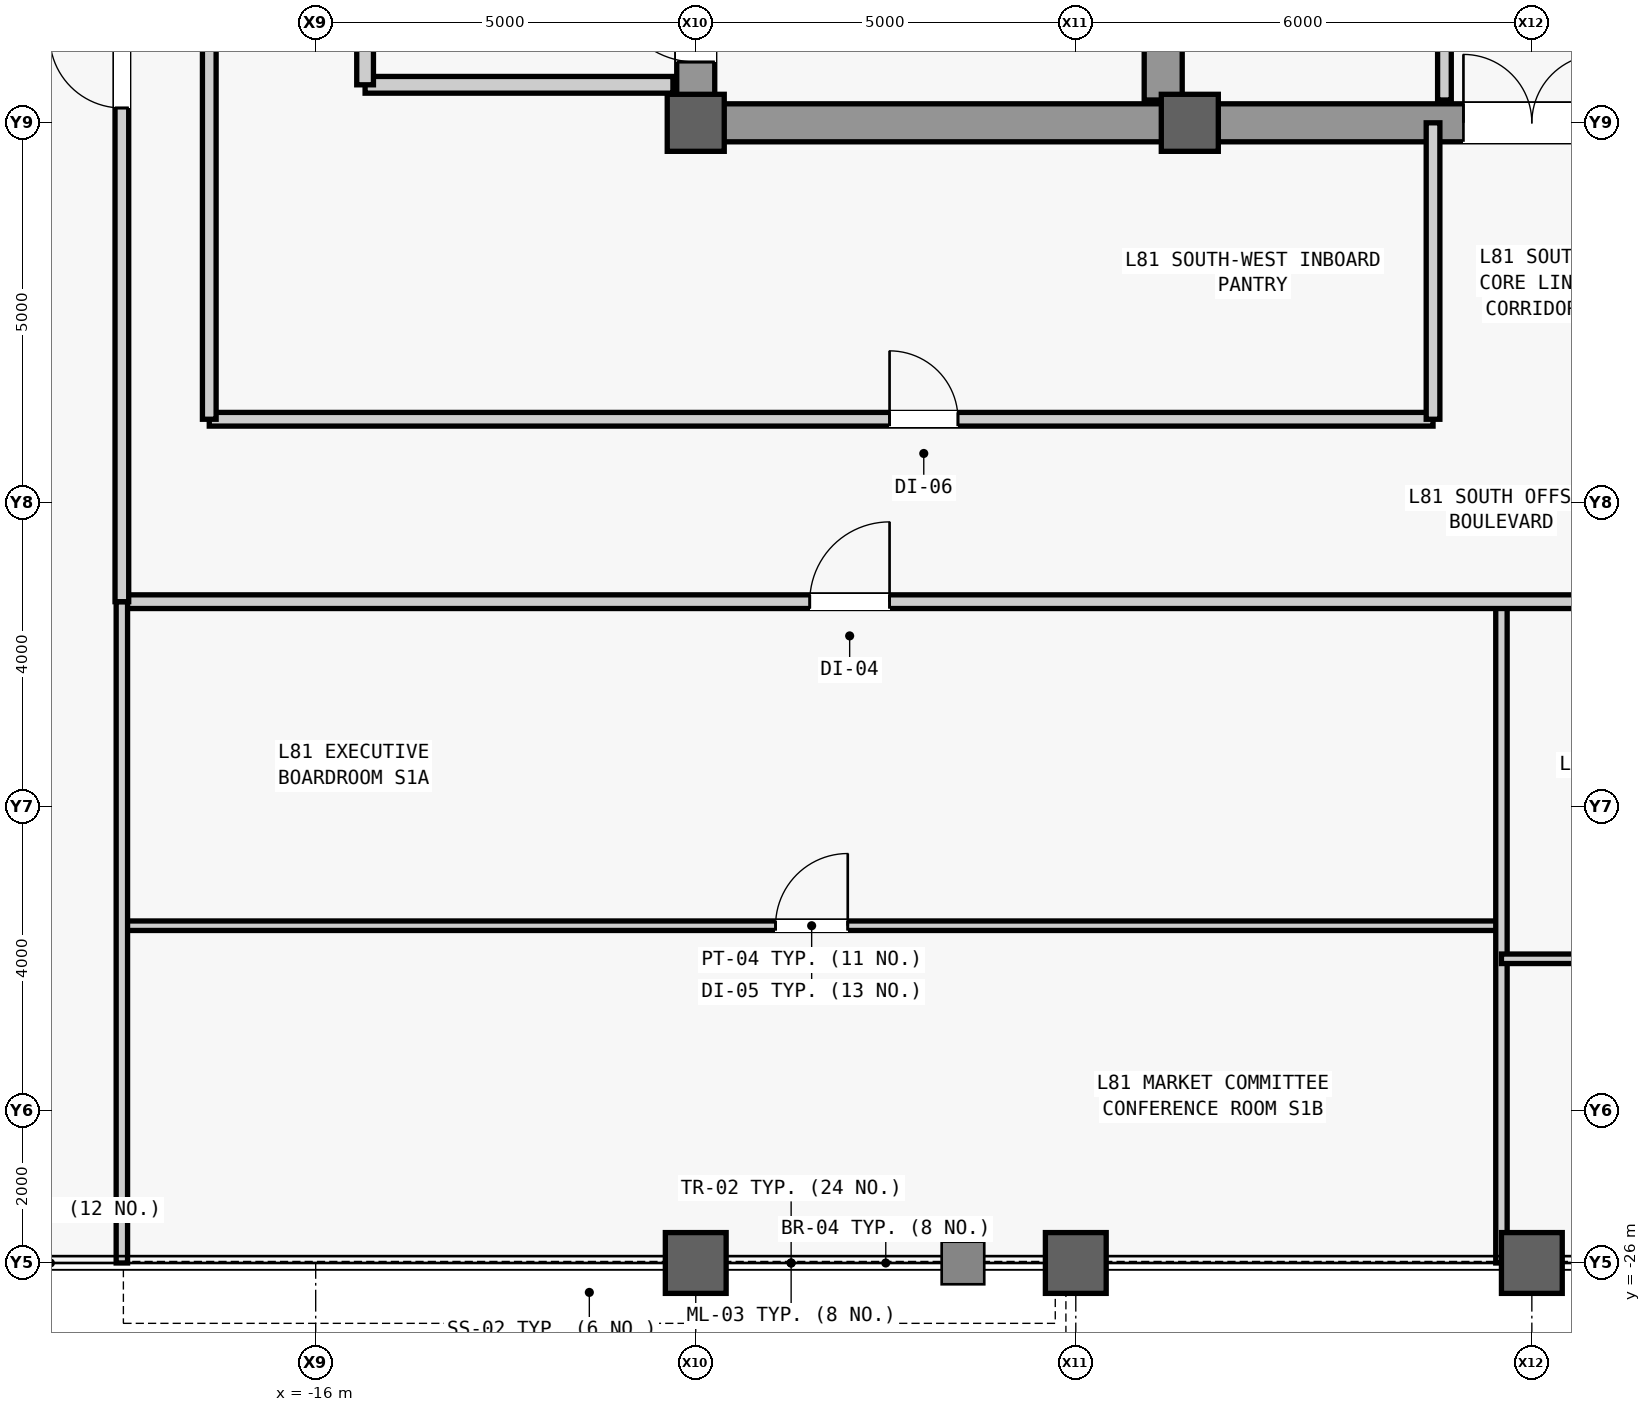
"""IFC4 building model, lengths in metres.
Left out: names, types, materials, properties, quantities, classifications, styles, units other than length and angle.
Written with IfcOpenShell. Run it as: python <this file> out.ifc"""

import sys

from ifc_helpers import new_model, si_unit, direction, frame, frame_2d, origin, origin_2d, place, context, subcontext, project, spatial, rectangle, hollow_rectangle, extrude, source, transform, mapped, element, fill, save


model = new_model("IFC4")
c1 = context("Model", 3, precision=1e-05, world=origin(), true_north=direction((0.0, 1.0)))
c2 = subcontext(c1, "Body", "Model", "MODEL_VIEW")
j1 = project(units=[si_unit("LENGTHUNIT", "METRE"), si_unit("PLANEANGLEUNIT", "RADIAN")], contexts=[c1])
p1 = place(None, origin())
s1 = spatial("IfcSite", under=j1, at=p1, CompositionType="ELEMENT")
p2 = place(p1, origin())
s2 = spatial("IfcBuilding", under=s1, at=p2, CompositionType="ELEMENT")
p3 = place(p2, frame((0.0, 0.0, 342.3)))
s3 = spatial("IfcBuildingStorey", under=s2, at=p3, CompositionType="ELEMENT", Elevation=342.3)
m1 = source(origin(), c2, "Body", "SweptSolid", [
    extrude(rectangle(XDim=22.0, YDim=0.5, at=frame_2d((11.0, 0.0))), origin(), (0.0, 0.0, 1.0), 3.7),
])
p4 = place(p3, frame((-11.0, -11.0, 0.0), z_axis=(0.0, 0.0, 1.0), x_axis=(0.0, 1.0, 0.0)))
e1 = element("IfcWall", 1, at=p4, inside=s3, PredefinedType="SHEAR", context=c2, shape_type="MappedRepresentation", body=[
    mapped(m1, transform((0.0, 0.0, 0.0), scale=1.0)),
])
m2 = source(origin(), c2, "Body", "SweptSolid", [
    extrude(rectangle(XDim=1.1, YDim=2.2, at=frame_2d((0.55, 1.1))), frame((0.0, 0.26, 0.0), z_axis=(0.0, -1.0, 0.0), x_axis=(1.0, 0.0, 0.0)), (0.0, 0.0, 1.0), 0.52),
])
p5 = place(p4, frame((0.8, 0.0, 0.0)))
e2 = element("IfcOpeningElement", 2, at=p5, cuts=e1, PredefinedType="OPENING", context=c2, shape_type="MappedRepresentation", body=[
    mapped(m2, transform((0.0, 0.0, 0.0), scale=1.0)),
])
p6 = place(p4, frame((12.5, 0.0, 0.0)))
e3 = element("IfcOpeningElement", 3, at=p6, cuts=e1, PredefinedType="OPENING", context=c2, shape_type="MappedRepresentation", body=[
    mapped(m2, transform((0.0, 0.0, 0.0), scale=1.0)),
])
m3 = source(origin(), c2, "Body", "SweptSolid", [
    extrude(rectangle(XDim=0.9, YDim=2.15, at=frame_2d((0.45, 1.075))), frame((0.0, 0.26, 0.0), z_axis=(0.0, -1.0, 0.0), x_axis=(1.0, 0.0, 0.0)), (0.0, 0.0, 1.0), 0.52),
])
p7 = place(p4, frame((6.2, 0.0, 0.0)))
e4 = element("IfcOpeningElement", 4, at=p7, cuts=e1, PredefinedType="OPENING", context=c2, shape_type="MappedRepresentation", body=[
    mapped(m3, transform((0.0, 0.0, 0.0), scale=1.0)),
])
p8 = place(p4, frame((8.05, 0.0, 0.0)))
e5 = element("IfcOpeningElement", 5, at=p8, cuts=e1, PredefinedType="OPENING", context=c2, shape_type="MappedRepresentation", body=[
    mapped(m3, transform((0.0, 0.0, 0.0), scale=1.0)),
])
m4 = source(origin(), c2, "Body", "SweptSolid", [
    extrude(rectangle(XDim=1.2, YDim=2.3, at=frame_2d((0.6, 1.15))), frame((0.0, 0.26, 0.0), z_axis=(0.0, -1.0, 0.0), x_axis=(1.0, 0.0, 0.0)), (0.0, 0.0, 1.0), 0.52),
])
p9 = place(p4, frame((14.6, 0.0, 0.0)))
e6 = element("IfcOpeningElement", 6, at=p9, cuts=e1, PredefinedType="OPENING", context=c2, shape_type="MappedRepresentation", body=[
    mapped(m4, transform((0.0, 0.0, 0.0), scale=1.0)),
])
p10 = place(p4, frame((18.2, 0.0, 0.0)))
e7 = element("IfcOpeningElement", 7, at=p10, cuts=e1, PredefinedType="OPENING", context=c2, shape_type="MappedRepresentation", body=[
    mapped(m4, transform((0.0, 0.0, 0.0), scale=1.0)),
])
m5 = source(origin(), c2, "Body", "SweptSolid", [
    extrude(rectangle(XDim=1.3, YDim=2.3, at=frame_2d((0.65, 1.15))), frame((0.0, 0.26, 0.0), z_axis=(0.0, -1.0, 0.0), x_axis=(1.0, 0.0, 0.0)), (0.0, 0.0, 1.0), 0.52),
])
p11 = place(p4, frame((2.7, 0.0, 0.0)))
e8 = element("IfcOpeningElement", 8, at=p11, cuts=e1, PredefinedType="OPENING", context=c2, shape_type="MappedRepresentation", body=[
    mapped(m5, transform((0.0, 0.0, 0.0), scale=1.0)),
])
m6 = source(origin(), c2, "Body", "SweptSolid", [
    extrude(rectangle(XDim=21.4, YDim=0.5, at=frame_2d((10.7, 0.0))), origin(), (0.0, 0.0, 1.0), 3.7),
])
p12 = place(p3, frame((-4.85, -10.7, 0.0), z_axis=(0.0, 0.0, 1.0), x_axis=(0.0, 1.0, 0.0)))
e9 = element("IfcWall", 9, at=p12, inside=s3, PredefinedType="SHEAR", context=c2, shape_type="MappedRepresentation", body=[
    mapped(m6, transform((0.0, 0.0, 0.0), scale=1.0)),
])
m7 = source(origin(), c2, "Body", "SweptSolid", [
    extrude(rectangle(XDim=5.9, YDim=0.5, at=frame_2d((2.95, 0.0))), origin(), (0.0, 0.0, 1.0), 3.7),
])
p13 = place(p3, frame((-10.75, -11.0, 0.0), z_axis=(0.0, 0.0, 1.0), x_axis=(1.0, 0.0, 0.0)))
e10 = element("IfcWall", 10, at=p13, inside=s3, PredefinedType="SHEAR", context=c2, shape_type="MappedRepresentation", body=[
    mapped(m7, transform((0.0, 0.0, 0.0), scale=1.0)),
])
m8 = source(origin(), c2, "Body", "SweptSolid", [
    extrude(rectangle(XDim=9.2, YDim=0.5, at=frame_2d((4.6, 0.0))), origin(), (0.0, 0.0, 1.0), 3.7),
])
p14 = place(p3, frame((-4.6, -11.0, 0.0), z_axis=(0.0, 0.0, 1.0), x_axis=(1.0, 0.0, 0.0)))
e11 = element("IfcWall", 11, at=p14, inside=s3, PredefinedType="SHEAR", context=c2, shape_type="MappedRepresentation", body=[
    mapped(m8, transform((0.0, 0.0, 0.0), scale=1.0)),
])
m9 = source(origin(), c2, "Body", "SweptSolid", [
    extrude(rectangle(XDim=1.8, YDim=2.25, at=frame_2d((0.9, 1.125))), frame((0.0, 0.26, 0.0), z_axis=(0.0, -1.0, 0.0), x_axis=(1.0, 0.0, 0.0)), (0.0, 0.0, 1.0), 0.52),
])
p15 = place(p14, frame((3.7, 0.0, 0.0)))
e12 = element("IfcOpeningElement", 12, at=p15, cuts=e11, PredefinedType="OPENING", context=c2, shape_type="MappedRepresentation", body=[
    mapped(m9, transform((0.0, 0.0, 0.0), scale=1.0)),
])
m10 = source(origin(), c2, "Body", "SweptSolid", [
    extrude(hollow_rectangle(XDim=0.8, YDim=0.8, WallThickness=0.045, at=origin_2d()), origin(), (0.0, 0.0, 1.0), 4.0),
])
p16 = place(p3, frame((-11.0, -26.0, 0.0), z_axis=(0.0, 0.0, 1.0), x_axis=(1.0, 0.0, 0.0)))
e13 = element("IfcColumn", 13, at=p16, inside=s3, PredefinedType="COLUMN", context=c2, shape_type="MappedRepresentation", body=[
    mapped(m10, transform((0.0, 0.0, 0.0), scale=1.0)),
])
m11 = source(origin(), c2, "Body", "SweptSolid", [
    extrude(rectangle(XDim=0.75, YDim=0.75, at=origin_2d()), origin(), (0.0, 0.0, 1.0), 4.0),
])
p17 = place(p3, frame((-11.0, -11.0, 0.0), z_axis=(0.0, 0.0, 1.0), x_axis=(1.0, 0.0, 0.0)))
e14 = element("IfcColumn", 14, at=p17, inside=s3, PredefinedType="COLUMN", context=c2, shape_type="MappedRepresentation", body=[
    mapped(m11, transform((0.0, 0.0, 0.0), scale=1.0)),
])
p18 = place(p3, frame((-6.0, -26.0, 0.0), z_axis=(0.0, 0.0, 1.0), x_axis=(1.0, 0.0, 0.0)))
e15 = element("IfcColumn", 15, at=p18, inside=s3, PredefinedType="COLUMN", context=c2, shape_type="MappedRepresentation", body=[
    mapped(m10, transform((0.0, 0.0, 0.0), scale=1.0)),
])
p19 = place(p3, frame((-4.5, -11.0, 0.0), z_axis=(0.0, 0.0, 1.0), x_axis=(1.0, 0.0, 0.0)))
e16 = element("IfcColumn", 16, at=p19, inside=s3, PredefinedType="COLUMN", context=c2, shape_type="MappedRepresentation", body=[
    mapped(m11, transform((0.0, 0.0, 0.0), scale=1.0)),
])
p20 = place(p3, frame((0.0, -26.0, 0.0), z_axis=(0.0, 0.0, 1.0), x_axis=(1.0, 0.0, 0.0)))
e17 = element("IfcColumn", 17, at=p20, inside=s3, PredefinedType="COLUMN", context=c2, shape_type="MappedRepresentation", body=[
    mapped(m10, transform((0.0, 0.0, 0.0), scale=1.0)),
])
m12 = source(origin(), c2, "Body", "SweptSolid", [
    extrude(rectangle(XDim=4.05, YDim=0.22, at=frame_2d((2.025, 0.0))), origin(), (0.0, 0.0, 1.0), 3.7),
])
p21 = place(p3, frame((-15.35, -10.5, 0.0), z_axis=(0.0, 0.0, 1.0), x_axis=(1.0, 0.0, 0.0)))
e18 = element("IfcWall", 18, at=p21, inside=s3, PredefinedType="PARTITIONING", context=c2, shape_type="MappedRepresentation", body=[
    mapped(m12, transform((0.0, 0.0, 0.0), scale=1.0)),
])
m13 = source(origin(), c2, "Body", "SweptSolid", [
    extrude(rectangle(XDim=4.4, YDim=0.22, at=frame_2d((2.2, 0.0))), origin(), (0.0, 0.0, 1.0), 3.7),
])
p22 = place(p3, frame((-15.35, -10.5, 0.0), z_axis=(0.0, 0.0, 1.0), x_axis=(0.0, 1.0, 0.0)))
e19 = element("IfcWall", 19, at=p22, inside=s3, PredefinedType="PARTITIONING", context=c2, shape_type="MappedRepresentation", body=[
    mapped(m13, transform((0.0, 0.0, 0.0), scale=1.0)),
])
m14 = source(origin(), c2, "Body", "SweptSolid", [
    extrude(rectangle(XDim=1.2, YDim=2.2, at=frame_2d((0.6, 1.1))), frame((0.0, 0.12, 0.0), z_axis=(0.0, -1.0, 0.0), x_axis=(1.0, 0.0, 0.0)), (0.0, 0.0, 1.0), 0.24),
])
p23 = place(p22, frame((1.6, 0.0, 0.0)))
e20 = element("IfcOpeningElement", 20, at=p23, cuts=e19, PredefinedType="OPENING", context=c2, shape_type="MappedRepresentation", body=[
    mapped(m14, transform((0.0, 0.0, 0.0), scale=1.0)),
])
m15 = source(origin(), c2, "Body", "SweptSolid", [
    extrude(rectangle(XDim=5.4, YDim=0.18, at=frame_2d((2.7, 0.0))), origin(), (0.0, 0.0, 1.0), 3.7),
])
p24 = place(p3, frame((-1.15, -10.7, 0.0), z_axis=(0.0, 0.0, 1.0), x_axis=(0.0, 1.0, 0.0)))
e21 = element("IfcWall", 21, at=p24, inside=s3, PredefinedType="PARTITIONING", context=c2, shape_type="MappedRepresentation", body=[
    mapped(m15, transform((0.0, 0.0, 0.0), scale=1.0)),
])
m16 = source(origin(), c2, "Body", "SweptSolid", [
    extrude(rectangle(XDim=0.9, YDim=2.15, at=frame_2d((0.45, 1.075))), frame((0.0, 0.1, 0.0), z_axis=(0.0, -1.0, 0.0), x_axis=(1.0, 0.0, 0.0)), (0.0, 0.0, 1.0), 0.2),
])
p25 = place(p24, frame((2.25, 0.0, 0.0)))
e22 = element("IfcOpeningElement", 22, at=p25, cuts=e21, PredefinedType="OPENING", context=c2, shape_type="MappedRepresentation", body=[
    mapped(m16, transform((0.0, 0.0, 0.0), scale=1.0)),
])
m17 = source(origin(), c2, "Body", "SweptSolid", [
    extrude(rectangle(XDim=16.1, YDim=0.18, at=frame_2d((8.05, 0.0))), origin(), (0.0, 0.0, 1.0), 3.7),
])
p26 = place(p3, frame((-17.4, -14.9, 0.0), z_axis=(0.0, 0.0, 1.0), x_axis=(1.0, 0.0, 0.0)))
e23 = element("IfcWall", 23, at=p26, inside=s3, PredefinedType="PARTITIONING", context=c2, shape_type="MappedRepresentation", body=[
    mapped(m17, transform((0.0, 0.0, 0.0), scale=1.0)),
])
p27 = place(p26, frame((8.95, 0.0, 0.0)))
e24 = element("IfcOpeningElement", 24, at=p27, cuts=e23, PredefinedType="OPENING", context=c2, shape_type="MappedRepresentation", body=[
    mapped(m16, transform((0.0, 0.0, 0.0), scale=1.0)),
])
m18 = source(origin(), c2, "Body", "SweptSolid", [
    extrude(rectangle(XDim=5.1, YDim=0.18, at=frame_2d((2.55, 0.0))), origin(), (0.0, 0.0, 1.0), 3.7),
])
p28 = place(p3, frame((-17.4, -14.9, 0.0), z_axis=(0.0, 0.0, 1.0), x_axis=(0.0, 1.0, 0.0)))
e25 = element("IfcWall", 25, at=p28, inside=s3, PredefinedType="PARTITIONING", context=c2, shape_type="MappedRepresentation", body=[
    mapped(m18, transform((0.0, 0.0, 0.0), scale=1.0)),
])
m19 = source(origin(), c2, "Body", "SweptSolid", [
    extrude(rectangle(XDim=3.9, YDim=0.18, at=frame_2d((1.95, 0.0))), origin(), (0.0, 0.0, 1.0), 3.7),
])
p29 = place(p3, frame((-1.3, -14.9, 0.0), z_axis=(0.0, 0.0, 1.0), x_axis=(0.0, 1.0, 0.0)))
e26 = element("IfcWall", 26, at=p29, inside=s3, PredefinedType="PARTITIONING", context=c2, shape_type="MappedRepresentation", body=[
    mapped(m19, transform((0.0, 0.0, 0.0), scale=1.0)),
])
m20 = source(origin(), c2, "Body", "SweptSolid", [
    extrude(rectangle(XDim=18.15, YDim=0.125, at=frame_2d((9.075, 0.0))), origin(), (0.0, 0.0, 1.0), 3.7),
])
p30 = place(p3, frame((-18.55, -21.563, 0.0), z_axis=(0.0, 0.0, 1.0), x_axis=(1.0, 0.0, 0.0)))
e27 = element("IfcWall", 27, at=p30, inside=s3, PredefinedType="PARTITIONING", context=c2, shape_type="MappedRepresentation", body=[
    mapped(m20, transform((0.0, 0.0, 0.0), scale=1.0)),
])
m21 = source(origin(), c2, "Body", "SweptSolid", [
    extrude(rectangle(XDim=0.95, YDim=2.15, at=frame_2d((0.475, 1.075))), frame((0.0, 0.073, 0.0), z_axis=(0.0, -1.0, 0.0), x_axis=(1.0, 0.0, 0.0)), (0.0, 0.0, 1.0), 0.145),
])
p31 = place(p30, frame((8.6, 0.0, 0.0)))
e28 = element("IfcOpeningElement", 28, at=p31, cuts=e27, PredefinedType="OPENING", context=c2, shape_type="MappedRepresentation", body=[
    mapped(m21, transform((0.0, 0.0, 0.0), scale=1.0)),
])
m22 = source(origin(), c2, "Body", "SweptSolid", [
    extrude(rectangle(XDim=8.7, YDim=0.15, at=frame_2d((4.35, 0.0))), origin(), (0.0, 0.0, 1.0), 3.7),
])
p32 = place(p3, frame((-0.4, -26.0, 0.0), z_axis=(0.0, 0.0, 1.0), x_axis=(0.0, 1.0, 0.0)))
e29 = element("IfcWall", 29, at=p32, inside=s3, PredefinedType="PARTITIONING", context=c2, shape_type="MappedRepresentation", body=[
    mapped(m22, transform((0.0, 0.0, 0.0), scale=1.0)),
])
m23 = source(origin(), c2, "Body", "SweptSolid", [
    extrude(rectangle(XDim=18.15, YDim=0.125, at=frame_2d((9.075, 0.0))), origin(), (0.0, 0.0, 1.0), 3.7),
])
p33 = place(p3, frame((-0.4, -21.998, 0.0), z_axis=(0.0, 0.0, 1.0), x_axis=(1.0, 0.0, 0.0)))
e30 = element("IfcWall", 30, at=p33, inside=s3, PredefinedType="PARTITIONING", context=c2, shape_type="MappedRepresentation", body=[
    mapped(m23, transform((0.0, 0.0, 0.0), scale=1.0)),
])
p34 = place(p33, frame((8.6, 0.0, 0.0)))
e31 = element("IfcOpeningElement", 31, at=p34, cuts=e30, PredefinedType="OPENING", context=c2, shape_type="MappedRepresentation", body=[
    mapped(m21, transform((0.0, 0.0, 0.0), scale=1.0)),
])
m24 = source(origin(), c2, "Body", "SweptSolid", [
    extrude(rectangle(XDim=36.3, YDim=0.18, at=frame_2d((18.15, 0.0))), origin(), (0.0, 0.0, 1.0), 3.7),
])
p35 = place(p3, frame((-18.55, -17.3, 0.0), z_axis=(0.0, 0.0, 1.0), x_axis=(1.0, 0.0, 0.0)))
e32 = element("IfcWall", 32, at=p35, inside=s3, PredefinedType="PARTITIONING", context=c2, shape_type="MappedRepresentation", body=[
    mapped(m24, transform((0.0, 0.0, 0.0), scale=1.0)),
])
m25 = source(origin(), c2, "Body", "SweptSolid", [
    extrude(rectangle(XDim=1.05, YDim=2.2, at=frame_2d((0.525, 1.1))), frame((0.0, 0.1, 0.0), z_axis=(0.0, -1.0, 0.0), x_axis=(1.0, 0.0, 0.0)), (0.0, 0.0, 1.0), 0.2),
])
p36 = place(p35, frame((9.05, 0.0, 0.0)))
e33 = element("IfcOpeningElement", 33, at=p36, cuts=e32, PredefinedType="OPENING", context=c2, shape_type="MappedRepresentation", body=[
    mapped(m25, transform((0.0, 0.0, 0.0), scale=1.0)),
])
p37 = place(p35, frame((26.175, 0.0, 0.0)))
e34 = element("IfcOpeningElement", 34, at=p37, cuts=e32, PredefinedType="OPENING", context=c2, shape_type="MappedRepresentation", body=[
    mapped(m25, transform((0.0, 0.0, 0.0), scale=1.0)),
])
p38 = place(p3, frame((-18.55, -26.0, 0.0), z_axis=(0.0, 0.0, 1.0), x_axis=(0.0, 1.0, 0.0)))
e35 = element("IfcWall", 35, at=p38, inside=s3, PredefinedType="PARTITIONING", context=c2, shape_type="MappedRepresentation", body=[
    mapped(m22, transform((0.0, 0.0, 0.0), scale=1.0)),
])
m26 = source(origin(), c2, "Body", "SweptSolid", [
    extrude(rectangle(XDim=37.3, YDim=0.18, at=frame_2d((18.65, 0.0))), origin(), (0.0, 0.0, 1.0), 3.7),
])
p39 = place(p3, frame((-18.55, -17.3, 0.0), z_axis=(0.0, 0.0, 1.0), x_axis=(0.0, 1.0, 0.0)))
e36 = element("IfcWall", 36, at=p39, inside=s3, PredefinedType="PARTITIONING", context=c2, shape_type="MappedRepresentation", body=[
    mapped(m26, transform((0.0, 0.0, 0.0), scale=1.0)),
])
m27 = source(origin(), c2, "Body", "SweptSolid", [
    extrude(rectangle(XDim=0.95, YDim=2.15, at=frame_2d((0.475, 1.075))), frame((0.0, 0.1, 0.0), z_axis=(0.0, -1.0, 0.0), x_axis=(1.0, 0.0, 0.0)), (0.0, 0.0, 1.0), 0.2),
])
p40 = place(p39, frame((6.495, 0.0, 0.0)))
e37 = element("IfcOpeningElement", 37, at=p40, cuts=e36, PredefinedType="OPENING", context=c2, shape_type="MappedRepresentation", body=[
    mapped(m27, transform((0.0, 0.0, 0.0), scale=1.0)),
])
p41 = place(p39, frame((15.65, 0.0, 0.0)))
e38 = element("IfcOpeningElement", 38, at=p41, cuts=e36, PredefinedType="OPENING", context=c2, shape_type="MappedRepresentation", body=[
    mapped(m27, transform((0.0, 0.0, 0.0), scale=1.0)),
])
p42 = place(p39, frame((26.33, 0.0, 0.0)))
e39 = element("IfcOpeningElement", 39, at=p42, cuts=e36, PredefinedType="OPENING", context=c2, shape_type="MappedRepresentation", body=[
    mapped(m27, transform((0.0, 0.0, 0.0), scale=1.0)),
])
m28 = source(origin(), c2, "Body", "SweptSolid", [
    extrude(rectangle(XDim=1.1, YDim=2.2, at=frame_2d((0.55, 1.1))), frame((0.0, 0.025, 0.0), z_axis=(0.0, -1.0, 0.0), x_axis=(1.0, 0.0, 0.0)), (0.0, 0.0, 1.0), 0.05),
])
p43 = place(p5, origin())
e40 = element("IfcDoor", 40, at=p43, inside=s3, OperationType="SINGLE_SWING_RIGHT", PredefinedType="DOOR", context=c2, shape_type="MappedRepresentation", body=[
    mapped(m28, transform((0.0, 0.0, 0.0), scale=1.0)),
])
fill(e2, e40)
m29 = source(origin(), c2, "Body", "SweptSolid", [
    extrude(rectangle(XDim=1.8, YDim=2.25, at=frame_2d((0.9, 1.125))), frame((0.0, 0.025, 0.0), z_axis=(0.0, -1.0, 0.0), x_axis=(1.0, 0.0, 0.0)), (0.0, 0.0, 1.0), 0.05),
])
p44 = place(p15, origin())
e41 = element("IfcDoor", 41, at=p44, inside=s3, OperationType="SINGLE_SWING_LEFT", PredefinedType="DOOR", context=c2, shape_type="MappedRepresentation", body=[
    mapped(m29, transform((0.0, 0.0, 0.0), scale=1.0)),
])
fill(e12, e41)
m30 = source(origin(), c2, "Body", "SweptSolid", [
    extrude(rectangle(XDim=0.9, YDim=2.15, at=frame_2d((0.45, 1.075))), frame((0.0, 0.025, 0.0), z_axis=(0.0, -1.0, 0.0), x_axis=(1.0, 0.0, 0.0)), (0.0, 0.0, 1.0), 0.05),
])
p45 = place(p27, origin())
e42 = element("IfcDoor", 42, at=p45, inside=s3, OperationType="SINGLE_SWING_LEFT", PredefinedType="DOOR", context=c2, shape_type="MappedRepresentation", body=[
    mapped(m30, transform((0.0, 0.0, 0.0), scale=1.0)),
])
fill(e24, e42)
m31 = source(origin(), c2, "Body", "SweptSolid", [
    extrude(rectangle(XDim=0.95, YDim=2.15, at=frame_2d((0.475, 1.075))), frame((0.0, 0.025, 0.0), z_axis=(0.0, -1.0, 0.0), x_axis=(1.0, 0.0, 0.0)), (0.0, 0.0, 1.0), 0.05),
])
p46 = place(p31, origin())
e43 = element("IfcDoor", 43, at=p46, inside=s3, OperationType="SINGLE_SWING_RIGHT", PredefinedType="DOOR", context=c2, shape_type="MappedRepresentation", body=[
    mapped(m31, transform((0.0, 0.0, 0.0), scale=1.0)),
])
fill(e28, e43)
m32 = source(origin(), c2, "Body", "SweptSolid", [
    extrude(rectangle(XDim=1.05, YDim=2.2, at=frame_2d((0.525, 1.1))), frame((0.0, 0.025, 0.0), z_axis=(0.0, -1.0, 0.0), x_axis=(1.0, 0.0, 0.0)), (0.0, 0.0, 1.0), 0.05),
])
p47 = place(p36, origin())
e44 = element("IfcDoor", 44, at=p47, inside=s3, OperationType="SINGLE_SWING_RIGHT", PredefinedType="DOOR", context=c2, shape_type="MappedRepresentation", body=[
    mapped(m32, transform((0.0, 0.0, 0.0), scale=1.0)),
])
fill(e33, e44)
p48 = place(p40, origin())
e45 = element("IfcDoor", 45, at=p48, inside=s3, OperationType="SINGLE_SWING_RIGHT", PredefinedType="DOOR", context=c2, shape_type="MappedRepresentation", body=[
    mapped(m31, transform((0.0, 0.0, 0.0), scale=1.0)),
])
fill(e37, e45)
save(model, sys.argv[1])
